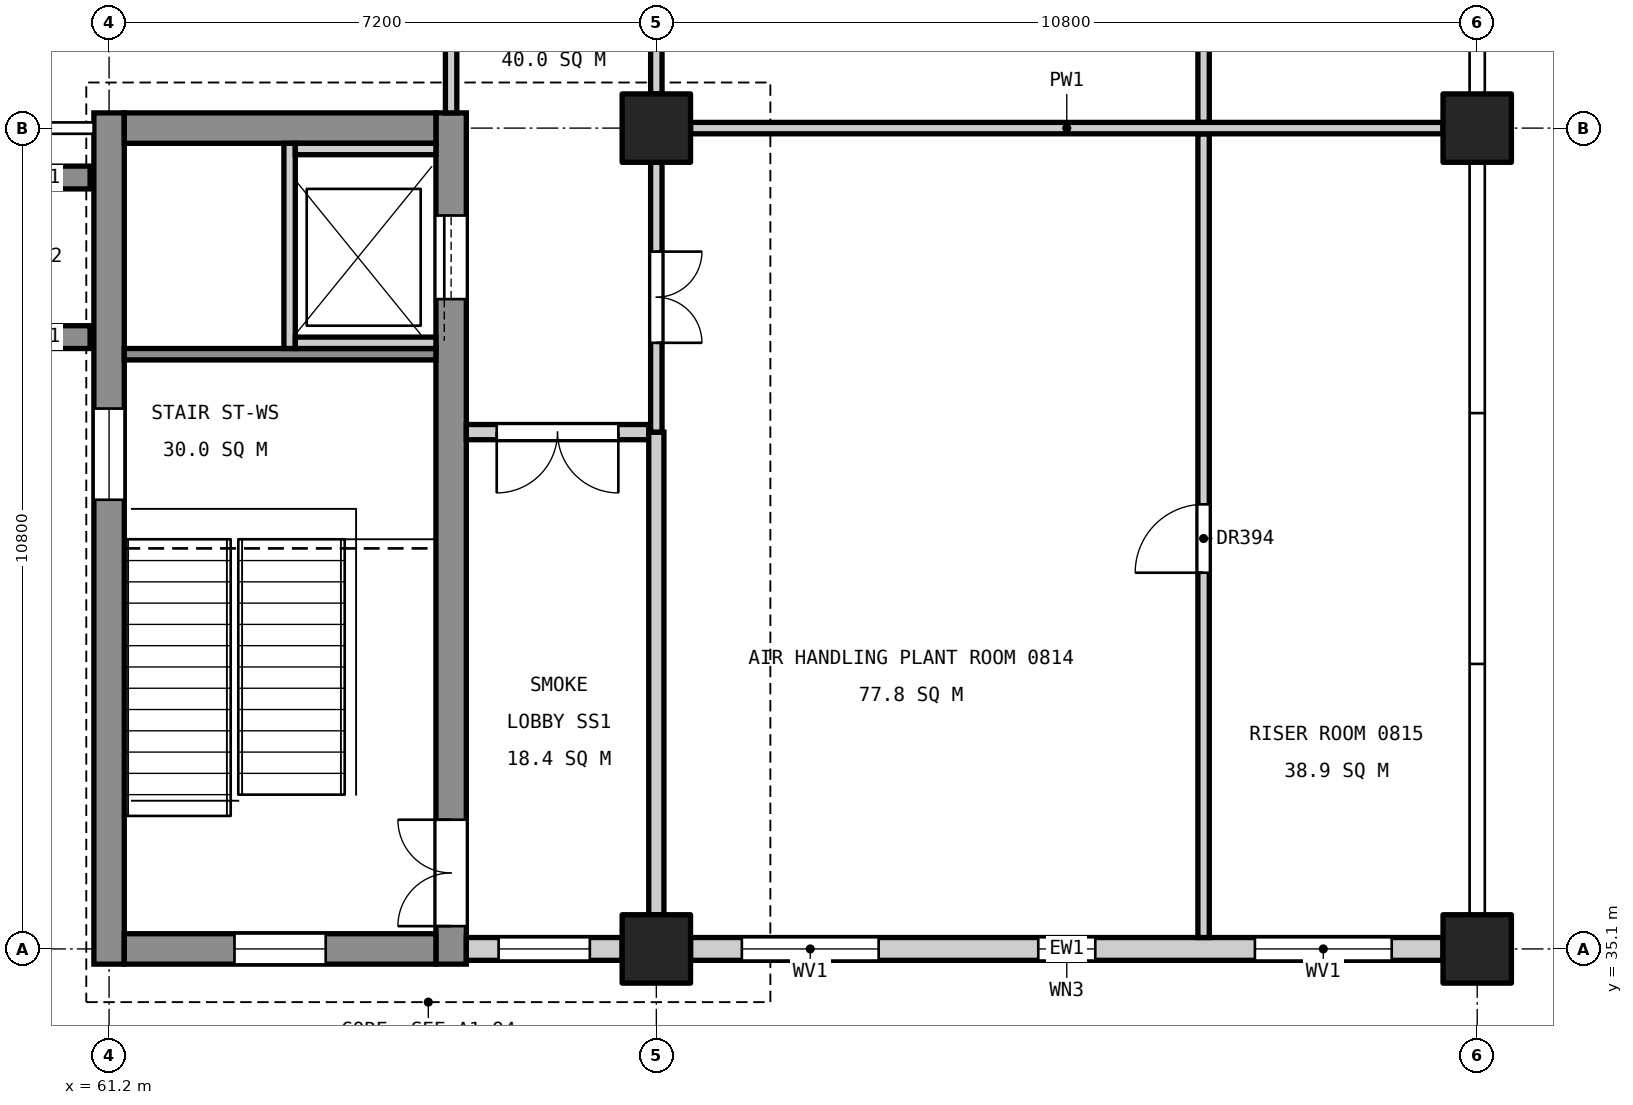
"""IFC4 building model, lengths in metres.
Left out: names, types, materials, properties, quantities, classifications, styles, units other than length and angle.
Written with IfcOpenShell. Run it as: python <this file> out.ifc"""

import sys

from ifc_helpers import new_model, si_unit, direction, frame, frame_2d, origin, origin_2d, place, context, subcontext, project, spatial, rectangle, extrude, element, fill, save


model = new_model("IFC4")
c1 = context("Model", 3, precision=1e-05, world=origin(), true_north=direction((0.0, 1.0)))
c2 = subcontext(c1, "Body", "Model", "MODEL_VIEW")
j1 = project(units=[si_unit("LENGTHUNIT", "METRE"), si_unit("PLANEANGLEUNIT", "RADIAN")], contexts=[c1])
p1 = place(None, origin())
s1 = spatial("IfcSite", under=j1, at=p1, CompositionType="ELEMENT")
p2 = place(p1, origin())
s2 = spatial("IfcBuilding", under=s1, at=p2, CompositionType="ELEMENT")
p3 = place(p2, frame((0.0, 0.0, 41.4)))
s3 = spatial("IfcBuildingStorey", under=s2, at=p3, CompositionType="ELEMENT", Elevation=41.4)
for number, where, z_axis, x_axis in (
    (1, (68.4, 35.1, 0.0), (0.0, 0.0, 1.0), (1.0, 0.0, 0.0)),
    (2, (68.4, 45.9, 0.0), (0.0, 0.0, 1.0), (1.0, 0.0, 0.0)),
    (3, (79.2, 35.1, 0.0), (0.0, 0.0, 1.0), (1.0, 0.0, 0.0)),
    (4, (79.2, 45.9, 0.0), (0.0, 0.0, 1.0), (1.0, 0.0, 0.0)),
):
    element("IfcColumn", number, at=place(p3, frame(where, z_axis=z_axis, x_axis=x_axis)), inside=s3, PredefinedType="COLUMN", context=c2, shape_type="SweptSolid", body=[
        extrude(rectangle(XDim=0.9, YDim=0.9, at=origin_2d()), origin(), (0.0, 0.0, 1.0), 4.8),
    ])
p4 = place(p3, frame((61.2, 34.9, 0.0), z_axis=(0.0, 0.0, 1.0), x_axis=(0.0, 1.0, 0.0)))
e5 = element("IfcWall", 5, at=p4, inside=s3, PredefinedType="SHEAR", context=c2, shape_type="SweptSolid", body=[
    extrude(rectangle(XDim=11.2, YDim=0.4, at=frame_2d((5.6, 0.0))), origin(), (0.0, 0.0, 1.0), 4.55),
])
p5 = place(p4, frame((6.11, 0.0, 3.4)))
e6 = element("IfcOpeningElement", 6, at=p5, cuts=e5, PredefinedType="OPENING", context=c2, shape_type="SweptSolid", body=[
    extrude(rectangle(XDim=1.2, YDim=0.9, at=frame_2d((0.6, 0.45))), frame((0.0, 0.21, 0.0), z_axis=(0.0, -1.0, 0.0), x_axis=(1.0, 0.0, 0.0)), (0.0, 0.0, 1.0), 0.42),
])
p6 = place(p3, frame((65.7, 34.9, 0.0), z_axis=(0.0, 0.0, 1.0), x_axis=(0.0, 1.0, 0.0)))
e7 = element("IfcWall", 7, at=p6, inside=s3, PredefinedType="SHEAR", context=c2, shape_type="SweptSolid", body=[
    extrude(rectangle(XDim=11.2, YDim=0.4, at=frame_2d((5.6, 0.0))), origin(), (0.0, 0.0, 1.0), 4.55),
])
p7 = place(p6, frame((0.5, 0.0, 0.0)))
e8 = element("IfcOpeningElement", 8, at=p7, cuts=e7, PredefinedType="OPENING", context=c2, shape_type="SweptSolid", body=[
    extrude(rectangle(XDim=1.4, YDim=2.1, at=frame_2d((0.7, 1.05))), frame((0.0, 0.21, 0.0), z_axis=(0.0, -1.0, 0.0), x_axis=(1.0, 0.0, 0.0)), (0.0, 0.0, 1.0), 0.42),
])
p8 = place(p6, frame((8.75, 0.0, 0.0)))
e9 = element("IfcOpeningElement", 9, at=p8, cuts=e7, PredefinedType="OPENING", context=c2, shape_type="SweptSolid", body=[
    extrude(rectangle(XDim=1.1, YDim=2.1, at=frame_2d((0.55, 1.05))), frame((0.0, 0.21, 0.0), z_axis=(0.0, -1.0, 0.0), x_axis=(1.0, 0.0, 0.0)), (0.0, 0.0, 1.0), 0.42),
])
p9 = place(p3, frame((61.4, 35.1, 0.0), z_axis=(0.0, 0.0, 1.0), x_axis=(1.0, 0.0, 0.0)))
e10 = element("IfcWall", 10, at=p9, inside=s3, PredefinedType="SHEAR", context=c2, shape_type="SweptSolid", body=[
    extrude(rectangle(XDim=4.1, YDim=0.4, at=frame_2d((2.05, 0.0))), origin(), (0.0, 0.0, 1.0), 4.55),
])
p10 = place(p9, frame((1.45, 0.0, 3.4)))
e11 = element("IfcOpeningElement", 11, at=p10, cuts=e10, PredefinedType="OPENING", context=c2, shape_type="SweptSolid", body=[
    extrude(rectangle(XDim=1.2, YDim=0.9, at=frame_2d((0.6, 0.45))), frame((0.0, 0.21, 0.0), z_axis=(0.0, -1.0, 0.0), x_axis=(1.0, 0.0, 0.0)), (0.0, 0.0, 1.0), 0.42),
])
p11 = place(p3, frame((61.4, 45.9, 0.0), z_axis=(0.0, 0.0, 1.0), x_axis=(1.0, 0.0, 0.0)))
e12 = element("IfcWall", 12, at=p11, inside=s3, PredefinedType="SHEAR", context=c2, shape_type="SweptSolid", body=[
    extrude(rectangle(XDim=4.1, YDim=0.4, at=frame_2d((2.05, 0.0))), origin(), (0.0, 0.0, 1.0), 4.55),
])
for number, where, z_axis, x_axis in (
    (13, (60.95, 43.15, 0.0), (0.0, 0.0, 1.0), (-1.0, 0.0, 0.0)),
    (14, (60.95, 45.25, 0.0), (0.0, 0.0, 1.0), (-1.0, 0.0, 0.0)),
):
    element("IfcWall", number, at=place(p3, frame(where, z_axis=z_axis, x_axis=x_axis)), inside=s3, PredefinedType="SHEAR", context=c2, shape_type="SweptSolid", body=[
        extrude(rectangle(XDim=1.25, YDim=0.3, at=frame_2d((0.625, 0.0))), origin(), (0.0, 0.0, 1.0), 4.8),
    ])
p12 = place(p3, frame((61.4, 42.925, 0.0), z_axis=(0.0, 0.0, 1.0), x_axis=(1.0, 0.0, 0.0)))
e15 = element("IfcWall", 15, at=p12, inside=s3, PredefinedType="SOLIDWALL", context=c2, shape_type="SweptSolid", body=[
    extrude(rectangle(XDim=4.1, YDim=0.15, at=frame_2d((2.05, 0.0))), origin(), (0.0, 0.0, 1.0), 4.55),
])
p13 = place(p3, frame((63.575, 43.0, 0.0), z_axis=(0.0, 0.0, 1.0), x_axis=(0.0, 1.0, 0.0)))
e16 = element("IfcWall", 16, at=p13, inside=s3, PredefinedType="SOLIDWALL", context=c2, shape_type="SweptSolid", body=[
    extrude(rectangle(XDim=2.7, YDim=0.15, at=frame_2d((1.35, 0.0))), origin(), (0.0, 0.0, 1.0), 4.8),
])
for number, where, z_axis, x_axis in (
    (17, (63.65, 43.075, 0.0), (0.0, 0.0, 1.0), (1.0, 0.0, 0.0)),
    (18, (63.65, 45.625, 0.0), (0.0, 0.0, 1.0), (1.0, 0.0, 0.0)),
):
    element("IfcWall", number, at=place(p3, frame(where, z_axis=z_axis, x_axis=x_axis)), inside=s3, PredefinedType="SOLIDWALL", context=c2, shape_type="SweptSolid", body=[
        extrude(rectangle(XDim=1.85, YDim=0.15, at=frame_2d((0.925, 0.0))), origin(), (0.0, 0.0, 1.0), 4.8),
    ])
p14 = place(p3, frame((65.9, 35.1, 0.0), z_axis=(0.0, 0.0, 1.0), x_axis=(1.0, 0.0, 0.0)))
e19 = element("IfcWall", 19, at=p14, inside=s3, PredefinedType="STANDARD", context=c2, shape_type="SweptSolid", body=[
    extrude(rectangle(XDim=2.05, YDim=0.3, at=frame_2d((1.025, 0.0))), origin(), (0.0, 0.0, 1.0), 3.85),
])
p15 = place(p14, frame((0.425, 0.0, 0.9)))
e20 = element("IfcOpeningElement", 20, at=p15, cuts=e19, PredefinedType="OPENING", context=c2, shape_type="SweptSolid", body=[
    extrude(rectangle(XDim=1.2, YDim=2.4, at=frame_2d((0.6, 1.2))), frame((0.0, 0.16, 0.0), z_axis=(0.0, -1.0, 0.0), x_axis=(1.0, 0.0, 0.0)), (0.0, 0.0, 1.0), 0.32),
])
p16 = place(p3, frame((68.85, 35.1, 0.0), z_axis=(0.0, 0.0, 1.0), x_axis=(1.0, 0.0, 0.0)))
e21 = element("IfcWall", 21, at=p16, inside=s3, PredefinedType="STANDARD", context=c2, shape_type="SweptSolid", body=[
    extrude(rectangle(XDim=9.9, YDim=0.3, at=frame_2d((4.95, 0.0))), origin(), (0.0, 0.0, 1.0), 3.85),
])
p17 = place(p16, frame((0.675, 0.0, 0.9)))
e22 = element("IfcOpeningElement", 22, at=p17, cuts=e21, PredefinedType="OPENING", context=c2, shape_type="SweptSolid", body=[
    extrude(rectangle(XDim=1.8, YDim=2.4, at=frame_2d((0.9, 1.2))), frame((0.0, 0.16, 0.0), z_axis=(0.0, -1.0, 0.0), x_axis=(1.0, 0.0, 0.0)), (0.0, 0.0, 1.0), 0.32),
])
p18 = place(p16, frame((4.575, 0.0, 0.8)))
e23 = element("IfcOpeningElement", 23, at=p18, cuts=e21, PredefinedType="OPENING", context=c2, shape_type="SweptSolid", body=[
    extrude(rectangle(XDim=0.75, YDim=1.2, at=frame_2d((0.375, 0.6))), frame((0.0, 0.16, 0.0), z_axis=(0.0, -1.0, 0.0), x_axis=(1.0, 0.0, 0.0)), (0.0, 0.0, 1.0), 0.32),
])
p19 = place(p16, frame((7.425, 0.0, 0.9)))
e24 = element("IfcOpeningElement", 24, at=p19, cuts=e21, PredefinedType="OPENING", context=c2, shape_type="SweptSolid", body=[
    extrude(rectangle(XDim=1.8, YDim=2.4, at=frame_2d((0.9, 1.2))), frame((0.0, 0.16, 0.0), z_axis=(0.0, -1.0, 0.0), x_axis=(1.0, 0.0, 0.0)), (0.0, 0.0, 1.0), 0.32),
])
p20 = place(p3, frame((65.7, 46.1, 0.0), z_axis=(0.0, 0.0, 1.0), x_axis=(0.0, 1.0, 0.0)))
e25 = element("IfcWall", 25, at=p20, inside=s3, PredefinedType="PARTITIONING", context=c2, shape_type="SweptSolid", body=[
    extrude(rectangle(XDim=10.45, YDim=0.15, at=frame_2d((5.225, 0.0))), origin(), (0.0, 0.0, 1.0), 3.55),
])
p21 = place(p20, frame((4.7, 0.0, 0.0)))
e26 = element("IfcOpeningElement", 26, at=p21, cuts=e25, PredefinedType="OPENING", context=c2, shape_type="SweptSolid", body=[
    extrude(rectangle(XDim=1.0, YDim=2.1, at=frame_2d((0.5, 1.05))), frame((0.0, 0.085, 0.0), z_axis=(0.0, -1.0, 0.0), x_axis=(1.0, 0.0, 0.0)), (0.0, 0.0, 1.0), 0.17),
])
p22 = place(p3, frame((65.9, 41.9, 0.0), z_axis=(0.0, 0.0, 1.0), x_axis=(1.0, 0.0, 0.0)))
e27 = element("IfcWall", 27, at=p22, inside=s3, PredefinedType="PARTITIONING", context=c2, shape_type="SweptSolid", body=[
    extrude(rectangle(XDim=2.4, YDim=0.2, at=frame_2d((1.2, 0.0))), origin(), (0.0, 0.0, 1.0), 3.55),
])
p23 = place(p22, frame((0.4, 0.0, 0.0)))
e28 = element("IfcOpeningElement", 28, at=p23, cuts=e27, PredefinedType="OPENING", context=c2, shape_type="SweptSolid", body=[
    extrude(rectangle(XDim=1.6, YDim=2.1, at=frame_2d((0.8, 1.05))), frame((0.0, 0.11, 0.0), z_axis=(0.0, -1.0, 0.0), x_axis=(1.0, 0.0, 0.0)), (0.0, 0.0, 1.0), 0.22),
])
p24 = place(p3, frame((68.4, 35.55, 0.0), z_axis=(0.0, 0.0, 1.0), x_axis=(0.0, 1.0, 0.0)))
e29 = element("IfcWall", 29, at=p24, inside=s3, PredefinedType="PARTITIONING", context=c2, shape_type="SweptSolid", body=[
    extrude(rectangle(XDim=6.35, YDim=0.2, at=frame_2d((3.175, 0.0))), origin(), (0.0, 0.0, 1.0), 3.55),
])
p25 = place(p3, frame((68.4, 41.9, 0.0), z_axis=(0.0, 0.0, 1.0), x_axis=(0.0, 1.0, 0.0)))
e30 = element("IfcWall", 30, at=p25, inside=s3, PredefinedType="PARTITIONING", context=c2, shape_type="SweptSolid", body=[
    extrude(rectangle(XDim=3.55, YDim=0.15, at=frame_2d((1.775, 0.0))), origin(), (0.0, 0.0, 1.0), 3.55),
])
p26 = place(p25, frame((1.175, 0.0, 0.0)))
e31 = element("IfcOpeningElement", 31, at=p26, cuts=e30, PredefinedType="OPENING", context=c2, shape_type="SweptSolid", body=[
    extrude(rectangle(XDim=1.2, YDim=2.1, at=frame_2d((0.6, 1.05))), frame((0.0, 0.085, 0.0), z_axis=(0.0, -1.0, 0.0), x_axis=(1.0, 0.0, 0.0)), (0.0, 0.0, 1.0), 0.17),
])
p27 = place(p3, frame((68.4, 46.35, 0.0), z_axis=(0.0, 0.0, 1.0), x_axis=(0.0, 1.0, 0.0)))
e32 = element("IfcWall", 32, at=p27, inside=s3, PredefinedType="PARTITIONING", context=c2, shape_type="SweptSolid", body=[
    extrude(rectangle(XDim=9.9, YDim=0.15, at=frame_2d((4.95, 0.0))), origin(), (0.0, 0.0, 1.0), 3.55),
])
p28 = place(p27, frame((2.775, 0.0, 0.0)))
e33 = element("IfcOpeningElement", 33, at=p28, cuts=e32, PredefinedType="OPENING", context=c2, shape_type="SweptSolid", body=[
    extrude(rectangle(XDim=1.2, YDim=2.1, at=frame_2d((0.6, 1.05))), frame((0.0, 0.085, 0.0), z_axis=(0.0, -1.0, 0.0), x_axis=(1.0, 0.0, 0.0)), (0.0, 0.0, 1.0), 0.17),
])
p29 = place(p27, frame((7.725, 0.0, 0.0)))
e34 = element("IfcOpeningElement", 34, at=p29, cuts=e32, PredefinedType="OPENING", context=c2, shape_type="SweptSolid", body=[
    extrude(rectangle(XDim=1.2, YDim=2.1, at=frame_2d((0.6, 1.05))), frame((0.0, 0.085, 0.0), z_axis=(0.0, -1.0, 0.0), x_axis=(1.0, 0.0, 0.0)), (0.0, 0.0, 1.0), 0.17),
])
p30 = place(p3, frame((75.6, 35.25, 0.0), z_axis=(0.0, 0.0, 1.0), x_axis=(0.0, 1.0, 0.0)))
e35 = element("IfcWall", 35, at=p30, inside=s3, PredefinedType="PARTITIONING", context=c2, shape_type="SweptSolid", body=[
    extrude(rectangle(XDim=10.575, YDim=0.15, at=frame_2d((5.288, 0.0))), origin(), (0.0, 0.0, 1.0), 3.55),
])
p31 = place(p30, frame((4.8, 0.0, 0.0)))
e36 = element("IfcOpeningElement", 36, at=p31, cuts=e35, PredefinedType="OPENING", context=c2, shape_type="SweptSolid", body=[
    extrude(rectangle(XDim=0.9, YDim=2.1, at=frame_2d((0.45, 1.05))), frame((0.0, 0.085, 0.0), z_axis=(0.0, -1.0, 0.0), x_axis=(1.0, 0.0, 0.0)), (0.0, 0.0, 1.0), 0.17),
])
p32 = place(p3, frame((75.6, 45.975, 0.0), z_axis=(0.0, 0.0, 1.0), x_axis=(0.0, 1.0, 0.0)))
e37 = element("IfcWall", 37, at=p32, inside=s3, PredefinedType="PARTITIONING", context=c2, shape_type="SweptSolid", body=[
    extrude(rectangle(XDim=7.05, YDim=0.15, at=frame_2d((3.525, 0.0))), origin(), (0.0, 0.0, 1.0), 3.55),
])
p33 = place(p32, frame((3.075, 0.0, 0.0)))
e38 = element("IfcOpeningElement", 38, at=p33, cuts=e37, PredefinedType="OPENING", context=c2, shape_type="SweptSolid", body=[
    extrude(rectangle(XDim=0.9, YDim=2.1, at=frame_2d((0.45, 1.05))), frame((0.0, 0.085, 0.0), z_axis=(0.0, -1.0, 0.0), x_axis=(1.0, 0.0, 0.0)), (0.0, 0.0, 1.0), 0.17),
])
p34 = place(p3, frame((68.85, 45.9, 0.0), z_axis=(0.0, 0.0, 1.0), x_axis=(1.0, 0.0, 0.0)))
e39 = element("IfcWall", 39, at=p34, inside=s3, PredefinedType="PARTITIONING", context=c2, shape_type="SweptSolid", body=[
    extrude(rectangle(XDim=9.9, YDim=0.15, at=frame_2d((4.95, 0.0))), origin(), (0.0, 0.0, 1.0), 3.85),
])
p35 = place(p7, origin())
e40 = element("IfcDoor", 40, at=p35, inside=s3, OperationType="DOUBLE_DOOR_SINGLE_SWING", PredefinedType="DOOR", context=c2, shape_type="SweptSolid", body=[
    extrude(rectangle(XDim=1.4, YDim=2.1, at=frame_2d((0.7, 1.05))), frame((0.0, 0.025, 0.0), z_axis=(0.0, -1.0, 0.0), x_axis=(1.0, 0.0, 0.0)), (0.0, 0.0, 1.0), 0.05),
])
fill(e8, e40)
p36 = place(p8, origin())
e41 = element("IfcDoor", 41, at=p36, inside=s3, OperationType="SLIDING_TO_LEFT", PredefinedType="DOOR", context=c2, shape_type="SweptSolid", body=[
    extrude(rectangle(XDim=1.1, YDim=2.1, at=frame_2d((0.55, 1.05))), frame((0.0, 0.025, 0.0), z_axis=(0.0, -1.0, 0.0), x_axis=(1.0, 0.0, 0.0)), (0.0, 0.0, 1.0), 0.05),
])
fill(e9, e41)
p37 = place(p15, origin())
e42 = element("IfcWindow", 42, at=p37, inside=s3, PartitioningType="SINGLE_PANEL", PredefinedType="WINDOW", context=c2, shape_type="SweptSolid", body=[
    extrude(rectangle(XDim=1.2, YDim=2.4, at=frame_2d((0.6, 1.2))), frame((0.0, 0.03, 0.0), z_axis=(0.0, -1.0, 0.0), x_axis=(1.0, 0.0, 0.0)), (0.0, 0.0, 1.0), 0.06),
])
fill(e20, e42)
p38 = place(p17, origin())
e43 = element("IfcWindow", 43, at=p38, inside=s3, PartitioningType="SINGLE_PANEL", PredefinedType="WINDOW", context=c2, shape_type="SweptSolid", body=[
    extrude(rectangle(XDim=1.8, YDim=2.4, at=frame_2d((0.9, 1.2))), frame((0.0, 0.03, 0.0), z_axis=(0.0, -1.0, 0.0), x_axis=(1.0, 0.0, 0.0)), (0.0, 0.0, 1.0), 0.06),
])
fill(e22, e43)
p39 = place(p18, origin())
e44 = element("IfcWindow", 44, at=p39, inside=s3, PartitioningType="SINGLE_PANEL", PredefinedType="WINDOW", context=c2, shape_type="SweptSolid", body=[
    extrude(rectangle(XDim=0.75, YDim=1.2, at=frame_2d((0.375, 0.6))), frame((0.0, 0.03, 0.0), z_axis=(0.0, -1.0, 0.0), x_axis=(1.0, 0.0, 0.0)), (0.0, 0.0, 1.0), 0.06),
])
fill(e23, e44)
p40 = place(p19, origin())
e45 = element("IfcWindow", 45, at=p40, inside=s3, PartitioningType="SINGLE_PANEL", PredefinedType="WINDOW", context=c2, shape_type="SweptSolid", body=[
    extrude(rectangle(XDim=1.8, YDim=2.4, at=frame_2d((0.9, 1.2))), frame((0.0, 0.03, 0.0), z_axis=(0.0, -1.0, 0.0), x_axis=(1.0, 0.0, 0.0)), (0.0, 0.0, 1.0), 0.06),
])
fill(e24, e45)
p41 = place(p5, origin())
e46 = element("IfcWindow", 46, at=p41, inside=s3, PartitioningType="SINGLE_PANEL", PredefinedType="WINDOW", context=c2, shape_type="SweptSolid", body=[
    extrude(rectangle(XDim=1.2, YDim=0.9, at=frame_2d((0.6, 0.45))), frame((0.0, 0.03, 0.0), z_axis=(0.0, -1.0, 0.0), x_axis=(1.0, 0.0, 0.0)), (0.0, 0.0, 1.0), 0.06),
])
fill(e6, e46)
p42 = place(p10, origin())
e47 = element("IfcWindow", 47, at=p42, inside=s3, PartitioningType="SINGLE_PANEL", PredefinedType="WINDOW", context=c2, shape_type="SweptSolid", body=[
    extrude(rectangle(XDim=1.2, YDim=0.9, at=frame_2d((0.6, 0.45))), frame((0.0, 0.03, 0.0), z_axis=(0.0, -1.0, 0.0), x_axis=(1.0, 0.0, 0.0)), (0.0, 0.0, 1.0), 0.06),
])
fill(e11, e47)
p43 = place(p26, frame((1.2, 0.0, 0.0), z_axis=(0.0, 0.0, 1.0), x_axis=(-1.0, 0.0, 0.0)))
e48 = element("IfcDoor", 48, at=p43, inside=s3, OperationType="DOUBLE_DOOR_SINGLE_SWING", PredefinedType="DOOR", context=c2, shape_type="SweptSolid", body=[
    extrude(rectangle(XDim=1.2, YDim=2.1, at=frame_2d((0.6, 1.05))), frame((0.0, 0.025, 0.0), z_axis=(0.0, -1.0, 0.0), x_axis=(1.0, 0.0, 0.0)), (0.0, 0.0, 1.0), 0.05),
])
fill(e31, e48)
p44 = place(p31, origin())
e49 = element("IfcDoor", 49, at=p44, inside=s3, OperationType="SINGLE_SWING_LEFT", PredefinedType="DOOR", context=c2, shape_type="SweptSolid", body=[
    extrude(rectangle(XDim=0.9, YDim=2.1, at=frame_2d((0.45, 1.05))), frame((0.0, 0.025, 0.0), z_axis=(0.0, -1.0, 0.0), x_axis=(1.0, 0.0, 0.0)), (0.0, 0.0, 1.0), 0.05),
])
fill(e36, e49)
p45 = place(p23, frame((1.6, 0.0, 0.0), z_axis=(0.0, 0.0, 1.0), x_axis=(-1.0, 0.0, 0.0)))
e50 = element("IfcDoor", 50, at=p45, inside=s3, OperationType="DOUBLE_DOOR_SINGLE_SWING", PredefinedType="DOOR", context=c2, shape_type="SweptSolid", body=[
    extrude(rectangle(XDim=1.6, YDim=2.1, at=frame_2d((0.8, 1.05))), frame((0.0, 0.025, 0.0), z_axis=(0.0, -1.0, 0.0), x_axis=(1.0, 0.0, 0.0)), (0.0, 0.0, 1.0), 0.05),
])
fill(e28, e50)
save(model, sys.argv[1])
